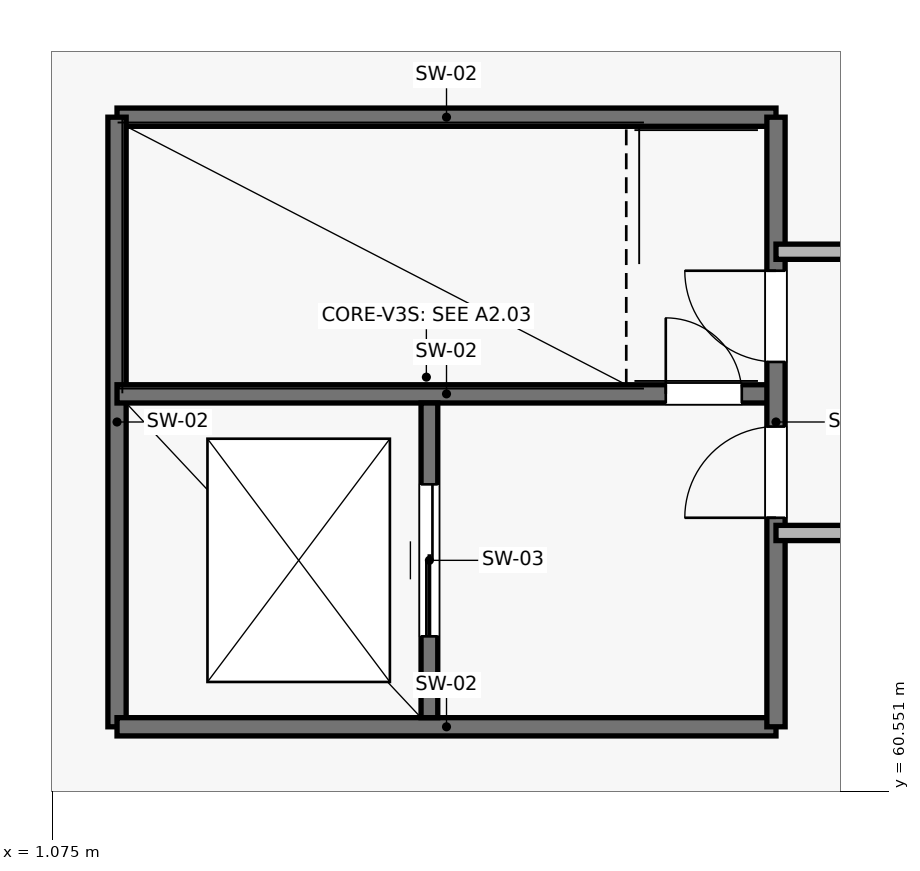
"""IFC4 building model, lengths in metres.
Left out: names, types, materials, properties, quantities, classifications, styles, units other than length and angle.
Written with IfcOpenShell. Run it as: python <this file> out.ifc"""

import sys

from ifc_helpers import new_model, si_unit, direction, frame, frame_2d, origin, place, context, subcontext, project, spatial, rectangle, extrude, element, fill, save


model = new_model("IFC4")
c1 = context("Model", 3, precision=1e-05, world=origin(), true_north=direction((0.0, 1.0)))
c2 = subcontext(c1, "Body", "Model", "MODEL_VIEW")
j1 = project(units=[si_unit("LENGTHUNIT", "METRE"), si_unit("PLANEANGLEUNIT", "RADIAN")], contexts=[c1])
p1 = place(None, origin())
s1 = spatial("IfcSite", under=j1, at=p1, CompositionType="ELEMENT")
p2 = place(p1, origin())
s2 = spatial("IfcBuilding", under=s1, at=p2, CompositionType="ELEMENT")
p3 = place(p2, frame((0.0, 0.0, 11.4)))
s3 = spatial("IfcBuildingStorey", under=s2, at=p3, CompositionType="ELEMENT", Elevation=11.4)
p4 = place(p3, frame((10.6, 69.42, 0.0), z_axis=(0.0, 0.0, 1.0), x_axis=(-1.0, 0.0, 0.0)))
e1 = element("IfcWall", 1, at=p4, inside=s3, PredefinedType="SHEAR", context=c2, shape_type="SweptSolid", body=[
    extrude(rectangle(XDim=8.67, YDim=0.24, at=frame_2d((4.335, 0.0))), origin(), (0.0, 0.0, 1.0), 4.59),
])
p5 = place(p3, frame((1.93, 69.42, 0.0), z_axis=(0.0, 0.0, 1.0), x_axis=(0.0, -1.0, 0.0)))
e2 = element("IfcWall", 2, at=p5, inside=s3, PredefinedType="SHEAR", context=c2, shape_type="SweptSolid", body=[
    extrude(rectangle(XDim=8.02, YDim=0.24, at=frame_2d((4.01, 0.0))), origin(), (0.0, 0.0, 1.0), 4.59),
])
p6 = place(p3, frame((1.93, 61.4, 0.0), z_axis=(0.0, 0.0, 1.0), x_axis=(1.0, 0.0, 0.0)))
e3 = element("IfcWall", 3, at=p6, inside=s3, PredefinedType="SHEAR", context=c2, shape_type="SweptSolid", body=[
    extrude(rectangle(XDim=8.67, YDim=0.24, at=frame_2d((4.335, 0.0))), origin(), (0.0, 0.0, 1.0), 4.59),
])
p7 = place(p3, frame((1.93, 65.78, 0.0), z_axis=(0.0, 0.0, 1.0), x_axis=(1.0, 0.0, 0.0)))
e4 = element("IfcWall", 4, at=p7, inside=s3, PredefinedType="SHEAR", context=c2, shape_type="SweptSolid", body=[
    extrude(rectangle(XDim=8.67, YDim=0.24, at=frame_2d((4.335, 0.0))), origin(), (0.0, 0.0, 1.0), 4.59),
])
p8 = place(p7, frame((7.22, 0.0, 0.0)))
e5 = element("IfcOpeningElement", 5, at=p8, cuts=e4, PredefinedType="OPENING", context=c2, shape_type="SweptSolid", body=[
    extrude(rectangle(XDim=1.0, YDim=2.2, at=frame_2d((0.5, 1.1))), frame((0.0, 0.135, 0.0), z_axis=(0.0, -1.0, 0.0), x_axis=(1.0, 0.0, 0.0)), (0.0, 0.0, 1.0), 0.27),
])
p9 = place(p3, frame((10.6, 61.4, 0.0), z_axis=(0.0, 0.0, 1.0), x_axis=(0.0, 1.0, 0.0)))
e6 = element("IfcWall", 6, at=p9, inside=s3, PredefinedType="SHEAR", context=c2, shape_type="SweptSolid", body=[
    extrude(rectangle(XDim=8.02, YDim=0.24, at=frame_2d((4.01, 0.0))), origin(), (0.0, 0.0, 1.0), 4.59),
])
p10 = place(p9, frame((2.75, 0.0, 0.0)))
e7 = element("IfcOpeningElement", 7, at=p10, cuts=e6, PredefinedType="OPENING", context=c2, shape_type="SweptSolid", body=[
    extrude(rectangle(XDim=1.2, YDim=2.2, at=frame_2d((0.6, 1.1))), frame((0.0, 0.135, 0.0), z_axis=(0.0, -1.0, 0.0), x_axis=(1.0, 0.0, 0.0)), (0.0, 0.0, 1.0), 0.27),
])
p11 = place(p9, frame((4.8, 0.0, 0.0)))
e8 = element("IfcOpeningElement", 8, at=p11, cuts=e6, PredefinedType="OPENING", context=c2, shape_type="SweptSolid", body=[
    extrude(rectangle(XDim=1.2, YDim=2.2, at=frame_2d((0.6, 1.1))), frame((0.0, 0.135, 0.0), z_axis=(0.0, -1.0, 0.0), x_axis=(1.0, 0.0, 0.0)), (0.0, 0.0, 1.0), 0.27),
])
p12 = place(p3, frame((6.04, 61.52, 0.0), z_axis=(0.0, 0.0, 1.0), x_axis=(0.0, 1.0, 0.0)))
e9 = element("IfcWall", 9, at=p12, inside=s3, PredefinedType="SHEAR", context=c2, shape_type="SweptSolid", body=[
    extrude(rectangle(XDim=4.14, YDim=0.22, at=frame_2d((2.07, 0.0))), origin(), (0.0, 0.0, 1.0), 4.59),
])
p13 = place(p12, frame((1.07, 0.0, 0.0)))
e10 = element("IfcOpeningElement", 10, at=p13, cuts=e9, PredefinedType="OPENING", context=c2, shape_type="SweptSolid", body=[
    extrude(rectangle(XDim=2.0, YDim=2.4, at=frame_2d((1.0, 1.2))), frame((0.0, 0.125, 0.0), z_axis=(0.0, -1.0, 0.0), x_axis=(1.0, 0.0, 0.0)), (0.0, 0.0, 1.0), 0.25),
])
for number, where, z_axis, x_axis in (
    (11, (10.6, 63.95, 0.0), (0.0, 0.0, 1.0), (1.0, 0.0, 0.0)),
    (12, (10.6, 67.65, 0.0), (0.0, 0.0, 1.0), (1.0, 0.0, 0.0)),
):
    element("IfcWall", number, at=place(p3, frame(where, z_axis=z_axis, x_axis=x_axis)), inside=s3, PredefinedType="PARTITIONING", context=c2, shape_type="SweptSolid", body=[
        extrude(rectangle(XDim=7.6, YDim=0.2, at=frame_2d((3.8, 0.0))), origin(), (0.0, 0.0, 1.0), 4.52),
    ])
p14 = place(p10, origin())
e13 = element("IfcDoor", 13, at=p14, inside=s3, OperationType="SINGLE_SWING_LEFT", PredefinedType="DOOR", context=c2, shape_type="SweptSolid", body=[
    extrude(rectangle(XDim=1.2, YDim=2.2, at=frame_2d((0.6, 1.1))), frame((0.0, 0.025, 0.0), z_axis=(0.0, -1.0, 0.0), x_axis=(1.0, 0.0, 0.0)), (0.0, 0.0, 1.0), 0.05),
])
fill(e7, e13)
p15 = place(p11, origin())
e14 = element("IfcDoor", 14, at=p15, inside=s3, OperationType="SINGLE_SWING_RIGHT", PredefinedType="DOOR", context=c2, shape_type="SweptSolid", body=[
    extrude(rectangle(XDim=1.2, YDim=2.2, at=frame_2d((0.6, 1.1))), frame((0.0, 0.025, 0.0), z_axis=(0.0, -1.0, 0.0), x_axis=(1.0, 0.0, 0.0)), (0.0, 0.0, 1.0), 0.05),
])
fill(e8, e14)
p16 = place(p8, origin())
e15 = element("IfcDoor", 15, at=p16, inside=s3, OperationType="SINGLE_SWING_LEFT", PredefinedType="DOOR", context=c2, shape_type="SweptSolid", body=[
    extrude(rectangle(XDim=1.0, YDim=2.2, at=frame_2d((0.5, 1.1))), frame((0.0, 0.025, 0.0), z_axis=(0.0, -1.0, 0.0), x_axis=(1.0, 0.0, 0.0)), (0.0, 0.0, 1.0), 0.05),
])
fill(e5, e15)
p17 = place(p13, origin())
e16 = element("IfcDoor", 16, at=p17, inside=s3, OperationType="DOUBLE_DOOR_SLIDING", PredefinedType="DOOR", context=c2, shape_type="SweptSolid", body=[
    extrude(rectangle(XDim=2.0, YDim=2.4, at=frame_2d((1.0, 1.2))), frame((0.0, 0.025, 0.0), z_axis=(0.0, -1.0, 0.0), x_axis=(1.0, 0.0, 0.0)), (0.0, 0.0, 1.0), 0.05),
])
fill(e10, e16)
save(model, sys.argv[1])
